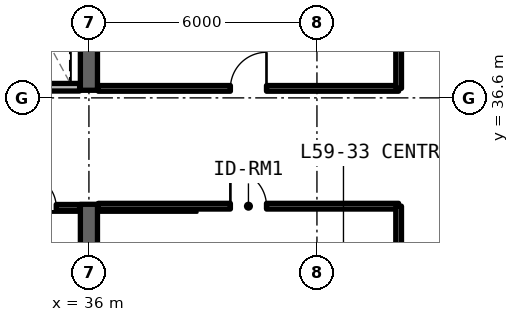
"""IFC4 building model, lengths in metres.
Left out: names, types, materials, properties, quantities, classifications, styles, units other than length and angle.
Written with IfcOpenShell. Run it as: python <this file> out.ifc"""

import sys

from ifc_helpers import new_model, si_unit, direction, frame, frame_2d, origin, place, context, subcontext, project, spatial, rectangle, extrude, element, fill, save


model = new_model("IFC4")
c1 = context("Model", 3, precision=1e-05, world=origin(), true_north=direction((0.0, 1.0)))
c2 = subcontext(c1, "Body", "Model", "MODEL_VIEW")
j1 = project(units=[si_unit("LENGTHUNIT", "METRE"), si_unit("PLANEANGLEUNIT", "RADIAN")], contexts=[c1])
p1 = place(None, origin())
s1 = spatial("IfcSite", under=j1, at=p1, CompositionType="ELEMENT")
p2 = place(p1, origin())
s2 = spatial("IfcBuilding", under=s1, at=p2, CompositionType="ELEMENT")
p3 = place(p2, frame((0.0, 0.0, 211.86)))
s3 = spatial("IfcBuildingStorey", under=s2, at=p3, CompositionType="ELEMENT", Elevation=211.86)
p4 = place(p3, frame((36.0, 24.825, 0.0), z_axis=(0.0, 0.0, 1.0), x_axis=(0.0, 1.0, 0.0)))
e1 = element("IfcWall", 1, at=p4, inside=s3, PredefinedType="SHEAR", context=c2, shape_type="SweptSolid", body=[
    extrude(rectangle(XDim=8.975, YDim=0.45, at=frame_2d((4.488, 0.0))), origin(), (0.0, 0.0, 1.0), 3.63),
])
p5 = place(p3, frame((36.0, 36.8, 0.0), z_axis=(0.0, 0.0, 1.0), x_axis=(0.0, 1.0, 0.0)))
e2 = element("IfcWall", 2, at=p5, inside=s3, PredefinedType="SHEAR", context=c2, shape_type="SweptSolid", body=[
    extrude(rectangle(XDim=5.575, YDim=0.45, at=frame_2d((2.788, 0.0))), origin(), (0.0, 0.0, 1.0), 3.63),
])
p6 = place(p3, frame((34.01, 33.72, 0.0), z_axis=(0.0, 0.0, 1.0), x_axis=(1.0, 0.0, 0.0)))
e3 = element("IfcWall", 3, at=p6, inside=s3, PredefinedType="SOLIDWALL", context=c2, shape_type="SweptSolid", body=[
    extrude(rectangle(XDim=1.745, YDim=0.15, at=frame_2d((0.873, 0.0))), origin(), (0.0, 0.0, 1.0), 2.63),
])
p7 = place(p6, frame((0.28, 0.0, 0.0)))
e4 = element("IfcOpeningElement", 4, at=p7, cuts=e3, PredefinedType="OPENING", context=c2, shape_type="SweptSolid", body=[
    extrude(rectangle(XDim=0.85, YDim=2.1, at=frame_2d((0.425, 1.05))), frame((0.0, 0.085, 0.0), z_axis=(0.0, -1.0, 0.0), x_axis=(1.0, 0.0, 0.0)), (0.0, 0.0, 1.0), 0.17),
])
p8 = place(p3, frame((32.68, 36.88, 0.0), z_axis=(0.0, 0.0, 1.0), x_axis=(1.0, 0.0, 0.0)))
e5 = element("IfcWall", 5, at=p8, inside=s3, PredefinedType="SOLIDWALL", context=c2, shape_type="SweptSolid", body=[
    extrude(rectangle(XDim=3.075, YDim=0.2, at=frame_2d((1.538, 0.0))), origin(), (0.0, 0.0, 1.0), 2.63),
])
p9 = place(p3, frame((36.245, 33.75, 0.0), z_axis=(0.0, 0.0, 1.0), x_axis=(1.0, 0.0, 0.0)))
e6 = element("IfcWall", 6, at=p9, inside=s3, PredefinedType="SOLIDWALL", context=c2, shape_type="SweptSolid", body=[
    extrude(rectangle(XDim=7.905, YDim=0.15, at=frame_2d((3.952, 0.0))), origin(), (0.0, 0.0, 1.0), 2.63),
])
p10 = place(p9, frame((3.478, 0.0, 0.0)))
e7 = element("IfcOpeningElement", 7, at=p10, cuts=e6, PredefinedType="OPENING", context=c2, shape_type="SweptSolid", body=[
    extrude(rectangle(XDim=0.95, YDim=2.15, at=frame_2d((0.475, 1.075))), frame((0.0, 0.085, 0.0), z_axis=(0.0, -1.0, 0.0), x_axis=(1.0, 0.0, 0.0)), (0.0, 0.0, 1.0), 0.17),
])
p11 = place(p3, frame((44.15, 24.35, 0.0), z_axis=(0.0, 0.0, 1.0), x_axis=(0.0, 1.0, 0.0)))
e8 = element("IfcWall", 8, at=p11, inside=s3, PredefinedType="SOLIDWALL", context=c2, shape_type="SweptSolid", body=[
    extrude(rectangle(XDim=9.4, YDim=0.15, at=frame_2d((4.7, 0.0))), origin(), (0.0, 0.0, 1.0), 2.63),
])
p12 = place(p3, frame((36.245, 36.85, 0.0), z_axis=(0.0, 0.0, 1.0), x_axis=(1.0, 0.0, 0.0)))
e9 = element("IfcWall", 9, at=p12, inside=s3, PredefinedType="SOLIDWALL", context=c2, shape_type="SweptSolid", body=[
    extrude(rectangle(XDim=7.905, YDim=0.15, at=frame_2d((3.952, 0.0))), origin(), (0.0, 0.0, 1.0), 2.63),
])
p13 = place(p12, frame((3.478, 0.0, 0.0)))
e10 = element("IfcOpeningElement", 10, at=p13, cuts=e9, PredefinedType="OPENING", context=c2, shape_type="SweptSolid", body=[
    extrude(rectangle(XDim=0.95, YDim=2.15, at=frame_2d((0.475, 1.075))), frame((0.0, 0.085, 0.0), z_axis=(0.0, -1.0, 0.0), x_axis=(1.0, 0.0, 0.0)), (0.0, 0.0, 1.0), 0.17),
])
p14 = place(p3, frame((44.15, 36.85, 0.0), z_axis=(0.0, 0.0, 1.0), x_axis=(0.0, 1.0, 0.0)))
e11 = element("IfcWall", 11, at=p14, inside=s3, PredefinedType="SOLIDWALL", context=c2, shape_type="SweptSolid", body=[
    extrude(rectangle(XDim=6.0, YDim=0.15, at=frame_2d((3.0, 0.0))), origin(), (0.0, 0.0, 1.0), 2.63),
])
p15 = place(p7, origin())
e12 = element("IfcDoor", 12, at=p15, inside=s3, OperationType="SINGLE_SWING_LEFT", PredefinedType="DOOR", context=c2, shape_type="SweptSolid", body=[
    extrude(rectangle(XDim=0.85, YDim=2.1, at=frame_2d((0.425, 1.05))), frame((0.0, 0.025, 0.0), z_axis=(0.0, -1.0, 0.0), x_axis=(1.0, 0.0, 0.0)), (0.0, 0.0, 1.0), 0.05),
])
fill(e4, e12)
p16 = place(p10, origin())
e13 = element("IfcDoor", 13, at=p16, inside=s3, OperationType="SINGLE_SWING_LEFT", PredefinedType="DOOR", context=c2, shape_type="SweptSolid", body=[
    extrude(rectangle(XDim=0.95, YDim=2.15, at=frame_2d((0.475, 1.075))), frame((0.0, 0.025, 0.0), z_axis=(0.0, -1.0, 0.0), x_axis=(1.0, 0.0, 0.0)), (0.0, 0.0, 1.0), 0.05),
])
fill(e7, e13)
p17 = place(p13, origin())
e14 = element("IfcDoor", 14, at=p17, inside=s3, OperationType="SINGLE_SWING_RIGHT", PredefinedType="DOOR", context=c2, shape_type="SweptSolid", body=[
    extrude(rectangle(XDim=0.95, YDim=2.15, at=frame_2d((0.475, 1.075))), frame((0.0, 0.025, 0.0), z_axis=(0.0, -1.0, 0.0), x_axis=(1.0, 0.0, 0.0)), (0.0, 0.0, 1.0), 0.05),
])
fill(e10, e14)
save(model, sys.argv[1])
